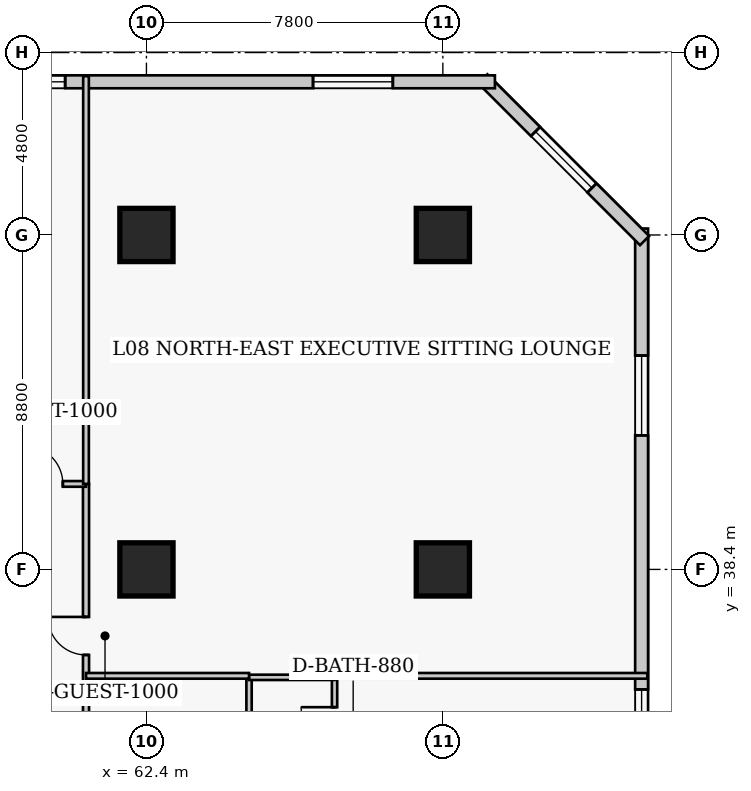
"""IFC4 building model, lengths in metres.
Left out: names, types, materials, properties, quantities, classifications, styles, units other than length and angle.
Written with IfcOpenShell. Run it as: python <this file> out.ifc"""

import sys

from ifc_helpers import new_model, si_unit, direction, frame, frame_2d, origin, origin_2d, place, context, subcontext, project, spatial, rectangle, extrude, element, fill, save


model = new_model("IFC4")
c1 = context("Model", 3, precision=1e-05, world=origin(), true_north=direction((0.0, 1.0)))
c2 = subcontext(c1, "Body", "Model", "MODEL_VIEW")
j1 = project(units=[si_unit("LENGTHUNIT", "METRE"), si_unit("PLANEANGLEUNIT", "RADIAN")], contexts=[c1])
p1 = place(None, origin())
s1 = spatial("IfcSite", under=j1, at=p1, CompositionType="ELEMENT")
p2 = place(p1, origin())
s2 = spatial("IfcBuilding", under=s1, at=p2, CompositionType="ELEMENT")
p3 = place(p2, frame((0.0, 0.0, 37.4)))
s3 = spatial("IfcBuildingStorey", under=s2, at=p3, CompositionType="ELEMENT", Elevation=37.4)
for number, where, z_axis, x_axis in (
    (1, (62.4, 38.4, 0.0), (0.0, 0.0, 1.0), (1.0, 0.0, 0.0)),
    (2, (62.4, 47.2, 0.0), (0.0, 0.0, 1.0), (1.0, 0.0, 0.0)),
    (3, (70.2, 38.4, 0.0), (0.0, 0.0, 1.0), (1.0, 0.0, 0.0)),
    (4, (70.2, 47.2, 0.0), (0.0, 0.0, 1.0), (1.0, 0.0, 0.0)),
):
    element("IfcColumn", number, at=place(p3, frame(where, z_axis=z_axis, x_axis=x_axis)), inside=s3, PredefinedType="COLUMN", context=c2, shape_type="SweptSolid", body=[
        extrude(rectangle(XDim=1.4, YDim=1.4, at=origin_2d()), origin(), (0.0, 0.0, 1.0), 3.8),
    ])
p4 = place(p3, frame((75.43, 12.23, 0.0), z_axis=(0.0, 0.0, 1.0), x_axis=(0.0, 1.0, 0.0)))
e5 = element("IfcWall", 5, at=p4, inside=s3, PredefinedType="SOLIDWALL", context=c2, shape_type="SweptSolid", body=[
    extrude(rectangle(XDim=35.14, YDim=0.34, at=frame_2d((17.57, 0.0))), origin(), (0.0, 0.0, 1.0), 3.54),
])
p5 = place(p4, frame((3.343, 0.0, 0.85)))
e6 = element("IfcOpeningElement", 6, at=p5, cuts=e5, PredefinedType="OPENING", context=c2, shape_type="SweptSolid", body=[
    extrude(rectangle(XDim=2.1, YDim=1.85, at=frame_2d((1.05, 0.925))), frame((0.0, 0.18, 0.0), z_axis=(0.0, -1.0, 0.0), x_axis=(1.0, 0.0, 0.0)), (0.0, 0.0, 1.0), 0.36),
])
p6 = place(p4, frame((12.127, 0.0, 0.85)))
e7 = element("IfcOpeningElement", 7, at=p6, cuts=e5, PredefinedType="OPENING", context=c2, shape_type="SweptSolid", body=[
    extrude(rectangle(XDim=2.1, YDim=1.85, at=frame_2d((1.05, 0.925))), frame((0.0, 0.18, 0.0), z_axis=(0.0, -1.0, 0.0), x_axis=(1.0, 0.0, 0.0)), (0.0, 0.0, 1.0), 0.36),
])
p7 = place(p4, frame((20.913, 0.0, 0.85)))
e8 = element("IfcOpeningElement", 8, at=p7, cuts=e5, PredefinedType="OPENING", context=c2, shape_type="SweptSolid", body=[
    extrude(rectangle(XDim=2.1, YDim=1.85, at=frame_2d((1.05, 0.925))), frame((0.0, 0.18, 0.0), z_axis=(0.0, -1.0, 0.0), x_axis=(1.0, 0.0, 0.0)), (0.0, 0.0, 1.0), 0.36),
])
p8 = place(p4, frame((29.698, 0.0, 0.85)))
e9 = element("IfcOpeningElement", 9, at=p8, cuts=e5, PredefinedType="OPENING", context=c2, shape_type="SweptSolid", body=[
    extrude(rectangle(XDim=2.1, YDim=1.85, at=frame_2d((1.05, 0.925))), frame((0.0, 0.18, 0.0), z_axis=(0.0, -1.0, 0.0), x_axis=(1.0, 0.0, 0.0)), (0.0, 0.0, 1.0), 0.36),
])
p9 = place(p3, frame((75.508, 47.052, 0.0), z_axis=(0.0, 0.0, 1.0), x_axis=(-0.707106781187, 0.707106781187, 0.0)))
e10 = element("IfcWall", 10, at=p9, inside=s3, PredefinedType="SOLIDWALL", context=c2, shape_type="SweptSolid", body=[
    extrude(rectangle(XDim=6.02, YDim=0.34, at=frame_2d((3.01, 0.0))), origin(), (0.0, 0.0, 1.0), 3.54),
])
p10 = place(p9, frame((1.96, 0.0, 0.85)))
e11 = element("IfcOpeningElement", 11, at=p10, cuts=e10, PredefinedType="OPENING", context=c2, shape_type="SweptSolid", body=[
    extrude(rectangle(XDim=2.1, YDim=1.85, at=frame_2d((1.05, 0.925))), frame((0.0, 0.18, 0.0), z_axis=(0.0, -1.0, 0.0), x_axis=(1.0, 0.0, 0.0)), (0.0, 0.0, 1.0), 0.36),
])
p11 = place(p3, frame((71.57, 51.23, 0.0), z_axis=(0.0, 0.0, 1.0), x_axis=(-1.0, 0.0, 0.0)))
e12 = element("IfcWall", 12, at=p11, inside=s3, PredefinedType="SOLIDWALL", context=c2, shape_type="SweptSolid", body=[
    extrude(rectangle(XDim=29.89, YDim=0.34, at=frame_2d((14.945, 0.0))), origin(), (0.0, 0.0, 1.0), 3.54),
])
p12 = place(p11, frame((2.686, 0.0, 0.85)))
e13 = element("IfcOpeningElement", 13, at=p12, cuts=e12, PredefinedType="OPENING", context=c2, shape_type="SweptSolid", body=[
    extrude(rectangle(XDim=2.1, YDim=1.85, at=frame_2d((1.05, 0.925))), frame((0.0, 0.18, 0.0), z_axis=(0.0, -1.0, 0.0), x_axis=(1.0, 0.0, 0.0)), (0.0, 0.0, 1.0), 0.36),
])
p13 = place(p11, frame((11.309, 0.0, 0.85)))
e14 = element("IfcOpeningElement", 14, at=p13, cuts=e12, PredefinedType="OPENING", context=c2, shape_type="SweptSolid", body=[
    extrude(rectangle(XDim=2.1, YDim=1.85, at=frame_2d((1.05, 0.925))), frame((0.0, 0.18, 0.0), z_axis=(0.0, -1.0, 0.0), x_axis=(1.0, 0.0, 0.0)), (0.0, 0.0, 1.0), 0.36),
])
p14 = place(p11, frame((17.631, 0.0, 0.85)))
e15 = element("IfcOpeningElement", 15, at=p14, cuts=e12, PredefinedType="OPENING", context=c2, shape_type="SweptSolid", body=[
    extrude(rectangle(XDim=2.1, YDim=1.85, at=frame_2d((1.05, 0.925))), frame((0.0, 0.18, 0.0), z_axis=(0.0, -1.0, 0.0), x_axis=(1.0, 0.0, 0.0)), (0.0, 0.0, 1.0), 0.36),
])
p15 = place(p11, frame((25.104, 0.0, 0.85)))
e16 = element("IfcOpeningElement", 16, at=p15, cuts=e12, PredefinedType="OPENING", context=c2, shape_type="SweptSolid", body=[
    extrude(rectangle(XDim=2.1, YDim=1.85, at=frame_2d((1.05, 0.925))), frame((0.0, 0.18, 0.0), z_axis=(0.0, -1.0, 0.0), x_axis=(1.0, 0.0, 0.0)), (0.0, 0.0, 1.0), 0.36),
])
p16 = place(p3, frame((60.81, 10.25, 0.0), z_axis=(0.0, 0.0, 1.0), x_axis=(0.0, 1.0, 0.0)))
e17 = element("IfcWall", 17, at=p16, inside=s3, PredefinedType="PARTITIONING", context=c2, shape_type="SweptSolid", body=[
    extrude(rectangle(XDim=30.4, YDim=0.16, at=frame_2d((15.2, 0.0))), origin(), (0.0, 0.0, 1.0), 3.54),
])
p17 = place(p16, frame((4.4, 0.0, 0.0)))
e18 = element("IfcOpeningElement", 18, at=p17, cuts=e17, PredefinedType="OPENING", context=c2, shape_type="SweptSolid", body=[
    extrude(rectangle(XDim=0.95, YDim=2.1, at=frame_2d((0.475, 1.05))), frame((0.0, 0.09, 0.0), z_axis=(0.0, -1.0, 0.0), x_axis=(1.0, 0.0, 0.0)), (0.0, 0.0, 1.0), 0.18),
])
p18 = place(p16, frame((13.175, 0.0, 0.0)))
e19 = element("IfcOpeningElement", 19, at=p18, cuts=e17, PredefinedType="OPENING", context=c2, shape_type="SweptSolid", body=[
    extrude(rectangle(XDim=0.95, YDim=2.1, at=frame_2d((0.475, 1.05))), frame((0.0, 0.09, 0.0), z_axis=(0.0, -1.0, 0.0), x_axis=(1.0, 0.0, 0.0)), (0.0, 0.0, 1.0), 0.18),
])
p19 = place(p16, frame((20.975, 0.0, 0.0)))
e20 = element("IfcOpeningElement", 20, at=p19, cuts=e17, PredefinedType="OPENING", context=c2, shape_type="SweptSolid", body=[
    extrude(rectangle(XDim=0.95, YDim=2.1, at=frame_2d((0.475, 1.05))), frame((0.0, 0.09, 0.0), z_axis=(0.0, -1.0, 0.0), x_axis=(1.0, 0.0, 0.0)), (0.0, 0.0, 1.0), 0.18),
])
p20 = place(p16, frame((25.9, 0.0, 0.0)))
e21 = element("IfcOpeningElement", 21, at=p20, cuts=e17, PredefinedType="OPENING", context=c2, shape_type="SweptSolid", body=[
    extrude(rectangle(XDim=1.0, YDim=2.15, at=frame_2d((0.5, 1.075))), frame((0.0, 0.09, 0.0), z_axis=(0.0, -1.0, 0.0), x_axis=(1.0, 0.0, 0.0)), (0.0, 0.0, 1.0), 0.18),
])
p21 = place(p3, frame((56.8, 40.65, 0.0), z_axis=(0.0, 0.0, 1.0), x_axis=(1.0, 0.0, 0.0)))
e22 = element("IfcWall", 22, at=p21, inside=s3, PredefinedType="PARTITIONING", context=c2, shape_type="SweptSolid", body=[
    extrude(rectangle(XDim=4.01, YDim=0.15, at=frame_2d((2.005, 0.0))), origin(), (0.0, 0.0, 1.0), 3.54),
])
p22 = place(p21, frame((2.4, 0.0, 0.0)))
e23 = element("IfcOpeningElement", 23, at=p22, cuts=e22, PredefinedType="OPENING", context=c2, shape_type="SweptSolid", body=[
    extrude(rectangle(XDim=1.0, YDim=2.15, at=frame_2d((0.5, 1.075))), frame((0.0, 0.085, 0.0), z_axis=(0.0, -1.0, 0.0), x_axis=(1.0, 0.0, 0.0)), (0.0, 0.0, 1.0), 0.17),
])
p23 = place(p3, frame((60.81, 40.65, 0.0), z_axis=(0.0, 0.0, 1.0), x_axis=(0.0, 1.0, 0.0)))
e24 = element("IfcWall", 24, at=p23, inside=s3, PredefinedType="PARTITIONING", context=c2, shape_type="SweptSolid", body=[
    extrude(rectangle(XDim=10.73, YDim=0.15, at=frame_2d((5.365, 0.0))), origin(), (0.0, 0.0, 1.0), 3.54),
])
p24 = place(p3, frame((65.1, 33.11, 0.0), z_axis=(0.0, 0.0, 1.0), x_axis=(0.0, 1.0, 0.0)))
e25 = element("IfcWall", 25, at=p24, inside=s3, PredefinedType="PLUMBINGWALL", context=c2, shape_type="SweptSolid", body=[
    extrude(rectangle(XDim=2.45, YDim=0.14, at=frame_2d((1.225, 0.0))), origin(), (0.0, 0.0, 1.0), 3.54),
])
p25 = place(p3, frame((67.35, 33.11, 0.0), z_axis=(0.0, 0.0, 1.0), x_axis=(0.0, 1.0, 0.0)))
e26 = element("IfcWall", 26, at=p25, inside=s3, PredefinedType="PLUMBINGWALL", context=c2, shape_type="SweptSolid", body=[
    extrude(rectangle(XDim=2.45, YDim=0.14, at=frame_2d((1.225, 0.0))), origin(), (0.0, 0.0, 1.0), 3.54),
])
p26 = place(p25, frame((0.785, 0.0, 0.0)))
e27 = element("IfcOpeningElement", 27, at=p26, cuts=e26, PredefinedType="OPENING", context=c2, shape_type="SweptSolid", body=[
    extrude(rectangle(XDim=0.88, YDim=2.05, at=frame_2d((0.44, 1.025))), frame((0.0, 0.08, 0.0), z_axis=(0.0, -1.0, 0.0), x_axis=(1.0, 0.0, 0.0)), (0.0, 0.0, 1.0), 0.16),
])
p27 = place(p3, frame((65.1, 35.56, 0.0), z_axis=(0.0, 0.0, 1.0), x_axis=(1.0, 0.0, 0.0)))
e28 = element("IfcWall", 28, at=p27, inside=s3, PredefinedType="PLUMBINGWALL", context=c2, shape_type="SweptSolid", body=[
    extrude(rectangle(XDim=2.25, YDim=0.14, at=frame_2d((1.125, 0.0))), origin(), (0.0, 0.0, 1.0), 3.54),
])
p28 = place(p3, frame((60.81, 35.6, 0.0), z_axis=(0.0, 0.0, 1.0), x_axis=(1.0, 0.0, 0.0)))
e29 = element("IfcWall", 29, at=p28, inside=s3, PredefinedType="PARTITIONING", context=c2, shape_type="SweptSolid", body=[
    extrude(rectangle(XDim=4.29, YDim=0.15, at=frame_2d((2.145, 0.0))), origin(), (0.0, 0.0, 1.0), 3.54),
])
p29 = place(p3, frame((67.35, 35.6, 0.0), z_axis=(0.0, 0.0, 1.0), x_axis=(1.0, 0.0, 0.0)))
e30 = element("IfcWall", 30, at=p29, inside=s3, PredefinedType="PARTITIONING", context=c2, shape_type="SweptSolid", body=[
    extrude(rectangle(XDim=8.23, YDim=0.15, at=frame_2d((4.115, 0.0))), origin(), (0.0, 0.0, 1.0), 3.54),
])
p30 = place(p7, origin())
e31 = element("IfcWindow", 31, at=p30, inside=s3, PartitioningType="SINGLE_PANEL", PredefinedType="WINDOW", context=c2, shape_type="SweptSolid", body=[
    extrude(rectangle(XDim=2.1, YDim=1.85, at=frame_2d((1.05, 0.925))), frame((0.0, 0.03, 0.0), z_axis=(0.0, -1.0, 0.0), x_axis=(1.0, 0.0, 0.0)), (0.0, 0.0, 1.0), 0.06),
])
fill(e8, e31)
p31 = place(p8, origin())
e32 = element("IfcWindow", 32, at=p31, inside=s3, PartitioningType="SINGLE_PANEL", PredefinedType="WINDOW", context=c2, shape_type="SweptSolid", body=[
    extrude(rectangle(XDim=2.1, YDim=1.85, at=frame_2d((1.05, 0.925))), frame((0.0, 0.03, 0.0), z_axis=(0.0, -1.0, 0.0), x_axis=(1.0, 0.0, 0.0)), (0.0, 0.0, 1.0), 0.06),
])
fill(e9, e32)
p32 = place(p10, origin())
e33 = element("IfcWindow", 33, at=p32, inside=s3, PartitioningType="SINGLE_PANEL", PredefinedType="WINDOW", context=c2, shape_type="SweptSolid", body=[
    extrude(rectangle(XDim=2.1, YDim=1.85, at=frame_2d((1.05, 0.925))), frame((0.0, 0.03, 0.0), z_axis=(0.0, -1.0, 0.0), x_axis=(1.0, 0.0, 0.0)), (0.0, 0.0, 1.0), 0.06),
])
fill(e11, e33)
p33 = place(p12, origin())
e34 = element("IfcWindow", 34, at=p33, inside=s3, PartitioningType="SINGLE_PANEL", PredefinedType="WINDOW", context=c2, shape_type="SweptSolid", body=[
    extrude(rectangle(XDim=2.1, YDim=1.85, at=frame_2d((1.05, 0.925))), frame((0.0, 0.03, 0.0), z_axis=(0.0, -1.0, 0.0), x_axis=(1.0, 0.0, 0.0)), (0.0, 0.0, 1.0), 0.06),
])
fill(e13, e34)
p34 = place(p13, origin())
e35 = element("IfcWindow", 35, at=p34, inside=s3, PartitioningType="SINGLE_PANEL", PredefinedType="WINDOW", context=c2, shape_type="SweptSolid", body=[
    extrude(rectangle(XDim=2.1, YDim=1.85, at=frame_2d((1.05, 0.925))), frame((0.0, 0.03, 0.0), z_axis=(0.0, -1.0, 0.0), x_axis=(1.0, 0.0, 0.0)), (0.0, 0.0, 1.0), 0.06),
])
fill(e14, e35)
p35 = place(p22, origin())
e36 = element("IfcDoor", 36, at=p35, inside=s3, OperationType="SINGLE_SWING_LEFT", PredefinedType="DOOR", context=c2, shape_type="SweptSolid", body=[
    extrude(rectangle(XDim=1.0, YDim=2.15, at=frame_2d((0.5, 1.075))), frame((0.0, 0.025, 0.0), z_axis=(0.0, -1.0, 0.0), x_axis=(1.0, 0.0, 0.0)), (0.0, 0.0, 1.0), 0.05),
])
fill(e23, e36)
p36 = place(p26, origin())
e37 = element("IfcDoor", 37, at=p36, inside=s3, OperationType="SINGLE_SWING_RIGHT", PredefinedType="DOOR", context=c2, shape_type="SweptSolid", body=[
    extrude(rectangle(XDim=0.88, YDim=2.05, at=frame_2d((0.44, 1.025))), frame((0.0, 0.025, 0.0), z_axis=(0.0, -1.0, 0.0), x_axis=(1.0, 0.0, 0.0)), (0.0, 0.0, 1.0), 0.05),
])
fill(e27, e37)
p37 = place(p20, origin())
e38 = element("IfcDoor", 38, at=p37, inside=s3, OperationType="SINGLE_SWING_RIGHT", PredefinedType="DOOR", context=c2, shape_type="SweptSolid", body=[
    extrude(rectangle(XDim=1.0, YDim=2.15, at=frame_2d((0.5, 1.075))), frame((0.0, 0.025, 0.0), z_axis=(0.0, -1.0, 0.0), x_axis=(1.0, 0.0, 0.0)), (0.0, 0.0, 1.0), 0.05),
])
fill(e21, e38)
save(model, sys.argv[1])
